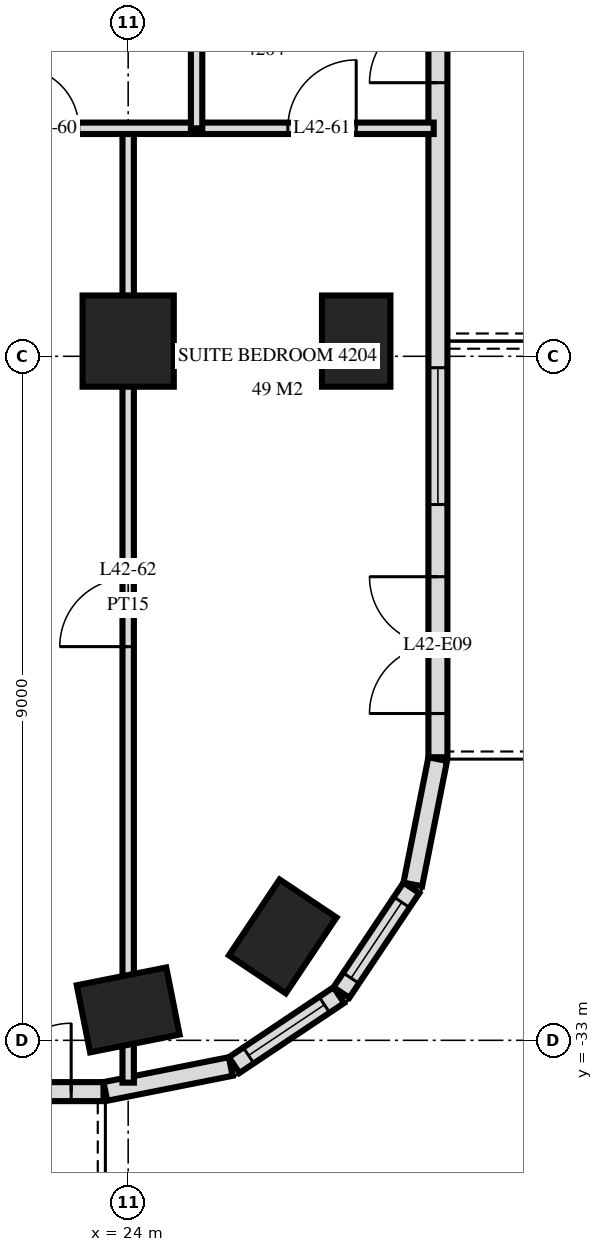
"""IFC4 building model, lengths in metres.
Left out: names, types, materials, properties, quantities, classifications, styles, units other than length and angle.
Written with IfcOpenShell. Run it as: python <this file> out.ifc"""

import sys

from ifc_helpers import new_model, si_unit, direction, frame, frame_2d, origin, origin_2d, place, context, subcontext, project, spatial, rectangle, extrude, element, fill, save


model = new_model("IFC4")
c1 = context("Model", 3, precision=1e-05, world=origin(), true_north=direction((0.0, 1.0)))
c2 = subcontext(c1, "Body", "Model", "MODEL_VIEW")
j1 = project(units=[si_unit("LENGTHUNIT", "METRE"), si_unit("PLANEANGLEUNIT", "RADIAN")], contexts=[c1])
p1 = place(None, origin())
s1 = spatial("IfcSite", under=j1, at=p1, CompositionType="ELEMENT")
p2 = place(p1, origin())
s2 = spatial("IfcBuilding", under=s1, at=p2, CompositionType="ELEMENT")
p3 = place(p2, frame((0.0, 0.0, 163.2)))
s3 = spatial("IfcBuildingStorey", under=s2, at=p3, CompositionType="ELEMENT", Elevation=163.2)
p4 = place(p3, frame((24.0, -32.6, 0.0), z_axis=(0.0, 0.0, 1.0), x_axis=(0.980792089743, 0.195056086032, 0.0)))
e1 = element("IfcColumn", 1, at=p4, inside=s3, PredefinedType="COLUMN", context=c2, shape_type="SweptSolid", body=[
    extrude(rectangle(XDim=1.2, YDim=0.9, at=origin_2d()), origin(), (0.0, 0.0, 1.0), 3.6),
])
p5 = place(p3, frame((24.0, -23.8, 0.0), z_axis=(0.0, 0.0, 1.0), x_axis=(1.0, 0.0, 0.0)))
e2 = element("IfcColumn", 2, at=p5, inside=s3, PredefinedType="COLUMN", context=c2, shape_type="SweptSolid", body=[
    extrude(rectangle(XDim=1.2, YDim=1.2, at=origin_2d()), origin(), (0.0, 0.0, 1.0), 3.6),
])
for number, where, z_axis, x_axis in (
    (3, (26.033, -31.633, 0.0), (0.0, 0.0, 1.0), (0.556, 0.831, 0.0)),
    (4, (27.0, -23.8, 0.0), (0.0, 0.0, 1.0), (0.0, 1.0, 0.0)),
):
    element("IfcColumn", number, at=place(p3, frame(where, z_axis=z_axis, x_axis=x_axis)), inside=s3, PredefinedType="COLUMN", context=c2, shape_type="SweptSolid", body=[
        extrude(rectangle(XDim=1.2, YDim=0.9, at=origin_2d()), origin(), (0.0, 0.0, 1.0), 3.6),
    ])
p6 = place(p3, frame((-23.675, -33.675, 0.0), z_axis=(0.0, 0.0, 1.0), x_axis=(1.0, 0.0, 0.0)))
e5 = element("IfcWall", 5, at=p6, inside=s3, PredefinedType="SOLIDWALL", context=c2, shape_type="SweptSolid", body=[
    extrude(rectangle(XDim=47.351, YDim=0.25, at=frame_2d((23.675, 0.0))), origin(), (0.0, 0.0, 1.0), 3.32),
])
p7 = place(p6, frame((0.575, 0.0, 0.0)))
e6 = element("IfcOpeningElement", 6, at=p7, cuts=e5, PredefinedType="OPENING", context=c2, shape_type="SweptSolid", body=[
    extrude(rectangle(XDim=1.8, YDim=2.4, at=frame_2d((0.9, 1.2))), frame((0.0, 0.135, 0.0), z_axis=(0.0, -1.0, 0.0), x_axis=(1.0, 0.0, 0.0)), (0.0, 0.0, 1.0), 0.27),
])
p8 = place(p6, frame((3.425, 0.0, 0.3)))
e7 = element("IfcOpeningElement", 7, at=p8, cuts=e5, PredefinedType="OPENING", context=c2, shape_type="SweptSolid", body=[
    extrude(rectangle(XDim=1.8, YDim=2.1, at=frame_2d((0.9, 1.05))), frame((0.0, 0.135, 0.0), z_axis=(0.0, -1.0, 0.0), x_axis=(1.0, 0.0, 0.0)), (0.0, 0.0, 1.0), 0.27),
])
p9 = place(p6, frame((5.975, 0.0, 0.3)))
e8 = element("IfcOpeningElement", 8, at=p9, cuts=e5, PredefinedType="OPENING", context=c2, shape_type="SweptSolid", body=[
    extrude(rectangle(XDim=2.4, YDim=2.1, at=frame_2d((1.2, 1.05))), frame((0.0, 0.135, 0.0), z_axis=(0.0, -1.0, 0.0), x_axis=(1.0, 0.0, 0.0)), (0.0, 0.0, 1.0), 0.27),
])
p10 = place(p6, frame((9.275, 0.0, 0.0)))
e9 = element("IfcOpeningElement", 9, at=p10, cuts=e5, PredefinedType="OPENING", context=c2, shape_type="SweptSolid", body=[
    extrude(rectangle(XDim=1.8, YDim=2.4, at=frame_2d((0.9, 1.2))), frame((0.0, 0.135, 0.0), z_axis=(0.0, -1.0, 0.0), x_axis=(1.0, 0.0, 0.0)), (0.0, 0.0, 1.0), 0.27),
])
p11 = place(p6, frame((12.275, 0.0, 0.0)))
e10 = element("IfcOpeningElement", 10, at=p11, cuts=e5, PredefinedType="OPENING", context=c2, shape_type="SweptSolid", body=[
    extrude(rectangle(XDim=1.8, YDim=2.4, at=frame_2d((0.9, 1.2))), frame((0.0, 0.135, 0.0), z_axis=(0.0, -1.0, 0.0), x_axis=(1.0, 0.0, 0.0)), (0.0, 0.0, 1.0), 0.27),
])
p12 = place(p6, frame((14.975, 0.0, 0.3)))
e11 = element("IfcOpeningElement", 11, at=p12, cuts=e5, PredefinedType="OPENING", context=c2, shape_type="SweptSolid", body=[
    extrude(rectangle(XDim=2.4, YDim=2.1, at=frame_2d((1.2, 1.05))), frame((0.0, 0.135, 0.0), z_axis=(0.0, -1.0, 0.0), x_axis=(1.0, 0.0, 0.0)), (0.0, 0.0, 1.0), 0.27),
])
p13 = place(p6, frame((17.975, 0.0, 0.3)))
e12 = element("IfcOpeningElement", 12, at=p13, cuts=e5, PredefinedType="OPENING", context=c2, shape_type="SweptSolid", body=[
    extrude(rectangle(XDim=2.4, YDim=2.1, at=frame_2d((1.2, 1.05))), frame((0.0, 0.135, 0.0), z_axis=(0.0, -1.0, 0.0), x_axis=(1.0, 0.0, 0.0)), (0.0, 0.0, 1.0), 0.27),
])
p14 = place(p6, frame((21.275, 0.0, 0.0)))
e13 = element("IfcOpeningElement", 13, at=p14, cuts=e5, PredefinedType="OPENING", context=c2, shape_type="SweptSolid", body=[
    extrude(rectangle(XDim=1.8, YDim=2.4, at=frame_2d((0.9, 1.2))), frame((0.0, 0.135, 0.0), z_axis=(0.0, -1.0, 0.0), x_axis=(1.0, 0.0, 0.0)), (0.0, 0.0, 1.0), 0.27),
])
p15 = place(p6, frame((24.275, 0.0, 0.0)))
e14 = element("IfcOpeningElement", 14, at=p15, cuts=e5, PredefinedType="OPENING", context=c2, shape_type="SweptSolid", body=[
    extrude(rectangle(XDim=1.8, YDim=2.4, at=frame_2d((0.9, 1.2))), frame((0.0, 0.135, 0.0), z_axis=(0.0, -1.0, 0.0), x_axis=(1.0, 0.0, 0.0)), (0.0, 0.0, 1.0), 0.27),
])
p16 = place(p6, frame((26.975, 0.0, 0.3)))
e15 = element("IfcOpeningElement", 15, at=p16, cuts=e5, PredefinedType="OPENING", context=c2, shape_type="SweptSolid", body=[
    extrude(rectangle(XDim=2.4, YDim=2.1, at=frame_2d((1.2, 1.05))), frame((0.0, 0.135, 0.0), z_axis=(0.0, -1.0, 0.0), x_axis=(1.0, 0.0, 0.0)), (0.0, 0.0, 1.0), 0.27),
])
p17 = place(p6, frame((30.275, 0.0, 0.0)))
e16 = element("IfcOpeningElement", 16, at=p17, cuts=e5, PredefinedType="OPENING", context=c2, shape_type="SweptSolid", body=[
    extrude(rectangle(XDim=1.8, YDim=2.4, at=frame_2d((0.9, 1.2))), frame((0.0, 0.135, 0.0), z_axis=(0.0, -1.0, 0.0), x_axis=(1.0, 0.0, 0.0)), (0.0, 0.0, 1.0), 0.27),
])
p18 = place(p6, frame((32.975, 0.0, 0.3)))
e17 = element("IfcOpeningElement", 17, at=p18, cuts=e5, PredefinedType="OPENING", context=c2, shape_type="SweptSolid", body=[
    extrude(rectangle(XDim=2.4, YDim=2.1, at=frame_2d((1.2, 1.05))), frame((0.0, 0.135, 0.0), z_axis=(0.0, -1.0, 0.0), x_axis=(1.0, 0.0, 0.0)), (0.0, 0.0, 1.0), 0.27),
])
p19 = place(p6, frame((36.275, 0.0, 0.0)))
e18 = element("IfcOpeningElement", 18, at=p19, cuts=e5, PredefinedType="OPENING", context=c2, shape_type="SweptSolid", body=[
    extrude(rectangle(XDim=1.8, YDim=2.4, at=frame_2d((0.9, 1.2))), frame((0.0, 0.135, 0.0), z_axis=(0.0, -1.0, 0.0), x_axis=(1.0, 0.0, 0.0)), (0.0, 0.0, 1.0), 0.27),
])
p20 = place(p6, frame((38.975, 0.0, 0.3)))
e19 = element("IfcOpeningElement", 19, at=p20, cuts=e5, PredefinedType="OPENING", context=c2, shape_type="SweptSolid", body=[
    extrude(rectangle(XDim=2.4, YDim=2.1, at=frame_2d((1.2, 1.05))), frame((0.0, 0.135, 0.0), z_axis=(0.0, -1.0, 0.0), x_axis=(1.0, 0.0, 0.0)), (0.0, 0.0, 1.0), 0.27),
])
p21 = place(p6, frame((41.975, 0.0, 0.3)))
e20 = element("IfcOpeningElement", 20, at=p21, cuts=e5, PredefinedType="OPENING", context=c2, shape_type="SweptSolid", body=[
    extrude(rectangle(XDim=2.4, YDim=2.1, at=frame_2d((1.2, 1.05))), frame((0.0, 0.135, 0.0), z_axis=(0.0, -1.0, 0.0), x_axis=(1.0, 0.0, 0.0)), (0.0, 0.0, 1.0), 0.27),
])
p22 = place(p6, frame((45.125, 0.0, 0.0)))
e21 = element("IfcOpeningElement", 21, at=p22, cuts=e5, PredefinedType="OPENING", context=c2, shape_type="SweptSolid", body=[
    extrude(rectangle(XDim=1.8, YDim=2.4, at=frame_2d((0.9, 1.2))), frame((0.0, 0.135, 0.0), z_axis=(0.0, -1.0, 0.0), x_axis=(1.0, 0.0, 0.0)), (0.0, 0.0, 1.0), 0.27),
])
p23 = place(p3, frame((23.7, -33.673, 0.0), z_axis=(0.0, 0.0, 1.0), x_axis=(0.980775640221, 0.19513878023, 0.0)))
e22 = element("IfcWall", 22, at=p23, inside=s3, PredefinedType="SOLIDWALL", context=c2, shape_type="SweptSolid", body=[
    extrude(rectangle(XDim=1.681, YDim=0.25, at=frame_2d((0.841, 0.0))), origin(), (0.0, 0.0, 1.0), 3.32),
])
p24 = place(p3, frame((25.394, -33.326, 0.0), z_axis=(0.0, 0.0, 1.0), x_axis=(0.831482937015, 0.55555029066, 0.0)))
e23 = element("IfcWall", 23, at=p24, inside=s3, PredefinedType="SOLIDWALL", context=c2, shape_type="SweptSolid", body=[
    extrude(rectangle(XDim=1.656, YDim=0.25, at=frame_2d((0.828, 0.0))), origin(), (0.0, 0.0, 1.0), 3.32),
])
p25 = place(p24, frame((0.228, 0.0, 0.9)))
e24 = element("IfcOpeningElement", 24, at=p25, cuts=e23, PredefinedType="OPENING", context=c2, shape_type="SweptSolid", body=[
    extrude(rectangle(XDim=1.2, YDim=1.5, at=frame_2d((0.6, 0.75))), frame((0.0, 0.135, 0.0), z_axis=(0.0, -1.0, 0.0), x_axis=(1.0, 0.0, 0.0)), (0.0, 0.0, 1.0), 0.27),
])
p26 = place(p3, frame((26.806, -32.371, 0.0), z_axis=(0.0, 0.0, 1.0), x_axis=(0.55555029066, 0.831482937015, 0.0)))
e25 = element("IfcWall", 25, at=p26, inside=s3, PredefinedType="SOLIDWALL", context=c2, shape_type="SweptSolid", body=[
    extrude(rectangle(XDim=1.656, YDim=0.25, at=frame_2d((0.828, 0.0))), origin(), (0.0, 0.0, 1.0), 3.32),
])
p27 = place(p26, frame((0.228, 0.0, 0.9)))
e26 = element("IfcOpeningElement", 26, at=p27, cuts=e25, PredefinedType="OPENING", context=c2, shape_type="SweptSolid", body=[
    extrude(rectangle(XDim=1.2, YDim=1.5, at=frame_2d((0.6, 0.75))), frame((0.0, 0.135, 0.0), z_axis=(0.0, -1.0, 0.0), x_axis=(1.0, 0.0, 0.0)), (0.0, 0.0, 1.0), 0.27),
])
p28 = place(p3, frame((27.745, -30.949, 0.0), z_axis=(0.0, 0.0, 1.0), x_axis=(0.194999110559, 0.980803419081, 0.0)))
e27 = element("IfcWall", 27, at=p28, inside=s3, PredefinedType="SOLIDWALL", context=c2, shape_type="SweptSolid", body=[
    extrude(rectangle(XDim=1.681, YDim=0.25, at=frame_2d((0.841, 0.0))), origin(), (0.0, 0.0, 1.0), 3.32),
])
p29 = place(p3, frame((28.075, -29.275, 0.0), z_axis=(0.0, 0.0, 1.0), x_axis=(0.0, 1.0, 0.0)))
e28 = element("IfcWall", 28, at=p29, inside=s3, PredefinedType="SOLIDWALL", context=c2, shape_type="SweptSolid", body=[
    extrude(rectangle(XDim=25.951, YDim=0.25, at=frame_2d((12.975, 0.0))), origin(), (0.0, 0.0, 1.0), 3.32),
])
p30 = place(p29, frame((0.575, 0.0, 0.0)))
e29 = element("IfcOpeningElement", 29, at=p30, cuts=e28, PredefinedType="OPENING", context=c2, shape_type="SweptSolid", body=[
    extrude(rectangle(XDim=1.8, YDim=2.4, at=frame_2d((0.9, 1.2))), frame((0.0, 0.135, 0.0), z_axis=(0.0, -1.0, 0.0), x_axis=(1.0, 0.0, 0.0)), (0.0, 0.0, 1.0), 0.27),
])
p31 = place(p29, frame((3.325, 0.0, 0.3)))
e30 = element("IfcOpeningElement", 30, at=p31, cuts=e28, PredefinedType="OPENING", context=c2, shape_type="SweptSolid", body=[
    extrude(rectangle(XDim=1.8, YDim=2.1, at=frame_2d((0.9, 1.05))), frame((0.0, 0.135, 0.0), z_axis=(0.0, -1.0, 0.0), x_axis=(1.0, 0.0, 0.0)), (0.0, 0.0, 1.0), 0.27),
])
p32 = place(p29, frame((8.875, 0.0, 0.0)))
e31 = element("IfcOpeningElement", 31, at=p32, cuts=e28, PredefinedType="OPENING", context=c2, shape_type="SweptSolid", body=[
    extrude(rectangle(XDim=1.8, YDim=2.4, at=frame_2d((0.9, 1.2))), frame((0.0, 0.135, 0.0), z_axis=(0.0, -1.0, 0.0), x_axis=(1.0, 0.0, 0.0)), (0.0, 0.0, 1.0), 0.27),
])
p33 = place(p29, frame((12.175, 0.0, 0.3)))
e32 = element("IfcOpeningElement", 32, at=p33, cuts=e28, PredefinedType="OPENING", context=c2, shape_type="SweptSolid", body=[
    extrude(rectangle(XDim=1.2, YDim=2.1, at=frame_2d((0.6, 1.05))), frame((0.0, 0.135, 0.0), z_axis=(0.0, -1.0, 0.0), x_axis=(1.0, 0.0, 0.0)), (0.0, 0.0, 1.0), 0.27),
])
p34 = place(p29, frame((17.5, 0.0, 0.0)))
e33 = element("IfcOpeningElement", 33, at=p34, cuts=e28, PredefinedType="OPENING", context=c2, shape_type="SweptSolid", body=[
    extrude(rectangle(XDim=1.8, YDim=2.4, at=frame_2d((0.9, 1.2))), frame((0.0, 0.135, 0.0), z_axis=(0.0, -1.0, 0.0), x_axis=(1.0, 0.0, 0.0)), (0.0, 0.0, 1.0), 0.27),
])
p35 = place(p3, frame((24.9, -21.0, 0.0), z_axis=(0.0, 0.0, 1.0), x_axis=(0.0, 1.0, 0.0)))
e34 = element("IfcWall", 34, at=p35, inside=s3, PredefinedType="PARTITIONING", context=c2, shape_type="SweptSolid", body=[
    extrude(rectangle(XDim=3.0, YDim=0.15, at=frame_2d((1.5, 0.0))), origin(), (0.0, 0.0, 1.0), 3.32),
])
p36 = place(p3, frame((24.0, -33.557, 0.0), z_axis=(0.0, 0.0, 1.0), x_axis=(0.0, 1.0, 0.0)))
e35 = element("IfcWall", 35, at=p36, inside=s3, PredefinedType="PARTITIONING", context=c2, shape_type="SweptSolid", body=[
    extrude(rectangle(XDim=12.557, YDim=0.15, at=frame_2d((6.278, 0.0))), origin(), (0.0, 0.0, 1.0), 3.32),
])
p37 = place(p36, frame((5.737, 0.0, 0.0)))
e36 = element("IfcOpeningElement", 36, at=p37, cuts=e35, PredefinedType="OPENING", context=c2, shape_type="SweptSolid", body=[
    extrude(rectangle(XDim=0.9, YDim=2.1, at=frame_2d((0.45, 1.05))), frame((0.0, 0.085, 0.0), z_axis=(0.0, -1.0, 0.0), x_axis=(1.0, 0.0, 0.0)), (0.0, 0.0, 1.0), 0.17),
])
p38 = place(p3, frame((21.9, -21.0, 0.0), z_axis=(0.0, 0.0, 1.0), x_axis=(1.0, 0.0, 0.0)))
e37 = element("IfcWall", 37, at=p38, inside=s3, PredefinedType="PARTITIONING", context=c2, shape_type="SweptSolid", body=[
    extrude(rectangle(XDim=6.12, YDim=0.15, at=frame_2d((3.06, 0.0))), origin(), (0.0, 0.0, 1.0), 3.32),
])
p39 = place(p38, frame((0.65, 0.0, 0.0)))
e38 = element("IfcOpeningElement", 38, at=p39, cuts=e37, PredefinedType="OPENING", context=c2, shape_type="SweptSolid", body=[
    extrude(rectangle(XDim=0.8, YDim=2.1, at=frame_2d((0.4, 1.05))), frame((0.0, 0.085, 0.0), z_axis=(0.0, -1.0, 0.0), x_axis=(1.0, 0.0, 0.0)), (0.0, 0.0, 1.0), 0.17),
])
p40 = place(p38, frame((4.2, 0.0, 0.0)))
e39 = element("IfcOpeningElement", 39, at=p40, cuts=e37, PredefinedType="OPENING", context=c2, shape_type="SweptSolid", body=[
    extrude(rectangle(XDim=0.9, YDim=2.1, at=frame_2d((0.45, 1.05))), frame((0.0, 0.085, 0.0), z_axis=(0.0, -1.0, 0.0), x_axis=(1.0, 0.0, 0.0)), (0.0, 0.0, 1.0), 0.17),
])
p41 = place(p25, origin())
e40 = element("IfcWindow", 40, at=p41, inside=s3, PartitioningType="SINGLE_PANEL", PredefinedType="WINDOW", context=c2, shape_type="SweptSolid", body=[
    extrude(rectangle(XDim=1.2, YDim=1.5, at=frame_2d((0.6, 0.75))), frame((0.0, 0.03, 0.0), z_axis=(0.0, -1.0, 0.0), x_axis=(1.0, 0.0, 0.0)), (0.0, 0.0, 1.0), 0.06),
])
fill(e24, e40)
p42 = place(p27, origin())
e41 = element("IfcWindow", 41, at=p42, inside=s3, PartitioningType="SINGLE_PANEL", PredefinedType="WINDOW", context=c2, shape_type="SweptSolid", body=[
    extrude(rectangle(XDim=1.2, YDim=1.5, at=frame_2d((0.6, 0.75))), frame((0.0, 0.03, 0.0), z_axis=(0.0, -1.0, 0.0), x_axis=(1.0, 0.0, 0.0)), (0.0, 0.0, 1.0), 0.06),
])
fill(e26, e41)
p43 = place(p22, origin())
e42 = element("IfcDoor", 42, at=p43, inside=s3, OperationType="DOUBLE_DOOR_SINGLE_SWING", PredefinedType="DOOR", context=c2, shape_type="SweptSolid", body=[
    extrude(rectangle(XDim=1.8, YDim=2.4, at=frame_2d((0.9, 1.2))), frame((0.0, 0.025, 0.0), z_axis=(0.0, -1.0, 0.0), x_axis=(1.0, 0.0, 0.0)), (0.0, 0.0, 1.0), 0.05),
])
fill(e21, e42)
p44 = place(p30, origin())
e43 = element("IfcDoor", 43, at=p44, inside=s3, OperationType="DOUBLE_DOOR_SINGLE_SWING", PredefinedType="DOOR", context=c2, shape_type="SweptSolid", body=[
    extrude(rectangle(XDim=1.8, YDim=2.4, at=frame_2d((0.9, 1.2))), frame((0.0, 0.025, 0.0), z_axis=(0.0, -1.0, 0.0), x_axis=(1.0, 0.0, 0.0)), (0.0, 0.0, 1.0), 0.05),
])
fill(e29, e43)
p45 = place(p31, origin())
e44 = element("IfcWindow", 44, at=p45, inside=s3, PartitioningType="SINGLE_PANEL", PredefinedType="WINDOW", context=c2, shape_type="SweptSolid", body=[
    extrude(rectangle(XDim=1.8, YDim=2.1, at=frame_2d((0.9, 1.05))), frame((0.0, 0.03, 0.0), z_axis=(0.0, -1.0, 0.0), x_axis=(1.0, 0.0, 0.0)), (0.0, 0.0, 1.0), 0.06),
])
fill(e30, e44)
p46 = place(p32, origin())
e45 = element("IfcDoor", 45, at=p46, inside=s3, OperationType="DOUBLE_DOOR_SINGLE_SWING", PredefinedType="DOOR", context=c2, shape_type="SweptSolid", body=[
    extrude(rectangle(XDim=1.8, YDim=2.4, at=frame_2d((0.9, 1.2))), frame((0.0, 0.025, 0.0), z_axis=(0.0, -1.0, 0.0), x_axis=(1.0, 0.0, 0.0)), (0.0, 0.0, 1.0), 0.05),
])
fill(e31, e45)
p47 = place(p39, origin())
e46 = element("IfcDoor", 46, at=p47, inside=s3, OperationType="SINGLE_SWING_RIGHT", PredefinedType="DOOR", context=c2, shape_type="SweptSolid", body=[
    extrude(rectangle(XDim=0.8, YDim=2.1, at=frame_2d((0.4, 1.05))), frame((0.0, 0.025, 0.0), z_axis=(0.0, -1.0, 0.0), x_axis=(1.0, 0.0, 0.0)), (0.0, 0.0, 1.0), 0.05),
])
fill(e38, e46)
p48 = place(p40, origin())
e47 = element("IfcDoor", 47, at=p48, inside=s3, OperationType="SINGLE_SWING_LEFT", PredefinedType="DOOR", context=c2, shape_type="SweptSolid", body=[
    extrude(rectangle(XDim=0.9, YDim=2.1, at=frame_2d((0.45, 1.05))), frame((0.0, 0.025, 0.0), z_axis=(0.0, -1.0, 0.0), x_axis=(1.0, 0.0, 0.0)), (0.0, 0.0, 1.0), 0.05),
])
fill(e39, e47)
p49 = place(p37, origin())
e48 = element("IfcDoor", 48, at=p49, inside=s3, OperationType="SINGLE_SWING_RIGHT", PredefinedType="DOOR", context=c2, shape_type="SweptSolid", body=[
    extrude(rectangle(XDim=0.9, YDim=2.1, at=frame_2d((0.45, 1.05))), frame((0.0, 0.025, 0.0), z_axis=(0.0, -1.0, 0.0), x_axis=(1.0, 0.0, 0.0)), (0.0, 0.0, 1.0), 0.05),
])
fill(e36, e48)
save(model, sys.argv[1])
